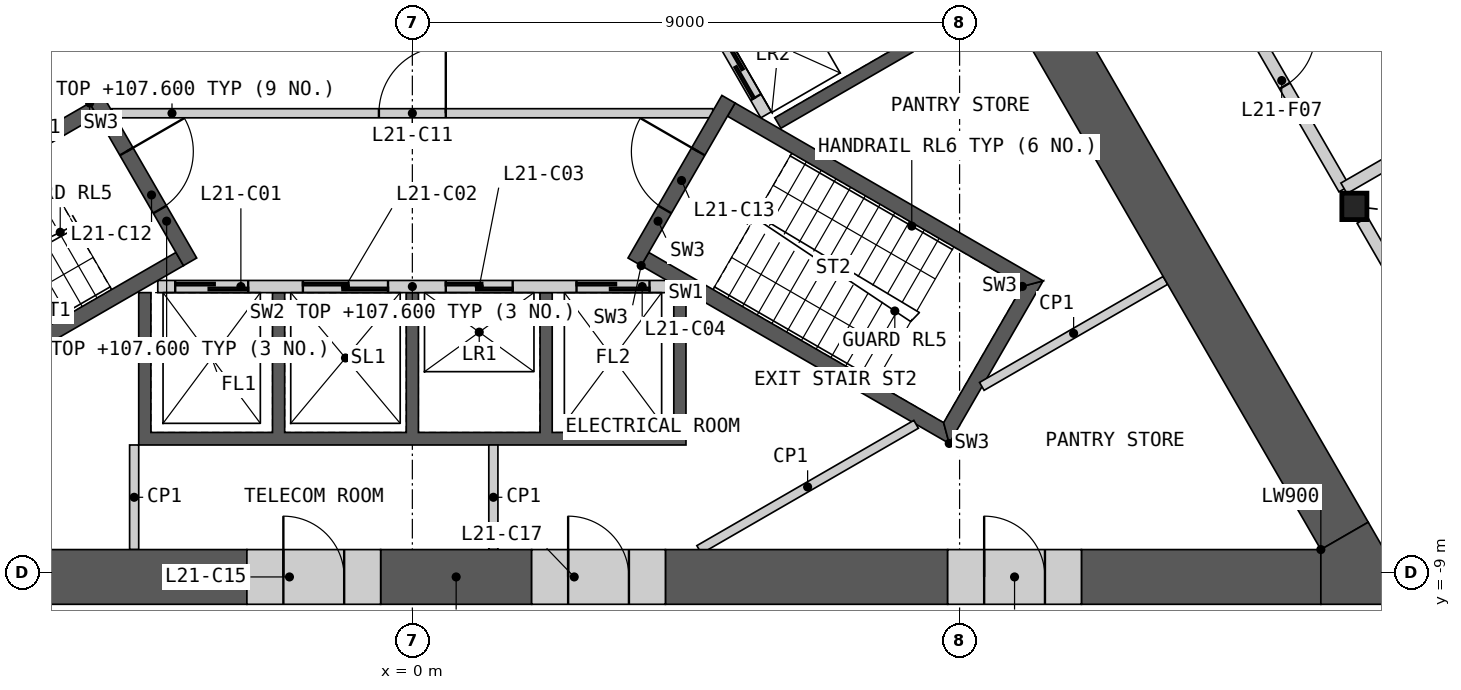
"""IFC4 building model, lengths in metres.
Left out: names, types, materials, properties, quantities, classifications, styles, units other than length and angle.
Written with IfcOpenShell. Run it as: python <this file> out.ifc"""

import sys

from ifc_helpers import new_model, si_unit, direction, frame, frame_2d, origin, origin_2d, place, context, subcontext, project, spatial, polyline, rectangle, i_section, outline, extrude, element, fill, save


model = new_model("IFC4")
c1 = context("Model", 3, precision=1e-05, world=origin(), true_north=direction((0.0, 1.0)))
c2 = subcontext(c1, "Body", "Model", "MODEL_VIEW")
j1 = project(units=[si_unit("LENGTHUNIT", "METRE"), si_unit("PLANEANGLEUNIT", "RADIAN")], contexts=[c1])
p1 = place(None, origin())
s1 = spatial("IfcSite", under=j1, at=p1, CompositionType="ELEMENT")
p2 = place(p1, origin())
s2 = spatial("IfcBuilding", under=s1, at=p2, CompositionType="ELEMENT")
p3 = place(p2, frame((0.0, 0.0, 103.8)))
s3 = spatial("IfcBuildingStorey", under=s2, at=p3, CompositionType="ELEMENT", Elevation=103.8)
p4 = place(p3, frame((15.493, -2.982, 0.0), z_axis=(0.0, 0.0, 1.0), x_axis=(1.0, 0.0, 0.0)))
e1 = element("IfcColumn", 1, at=p4, inside=s3, PredefinedType="COLUMN", context=c2, shape_type="SweptSolid", body=[
    extrude(i_section(OverallWidth=0.412, OverallDepth=0.435, WebThickness=0.036, FlangeThickness=0.057, at=origin_2d()), origin(), (0.0, 0.0, 1.0), 4.2),
])
p5 = place(p3, origin())
e2 = element("IfcWall", 2, at=p5, inside=s3, PredefinedType="SHEAR", context=c2, shape_type="SweptSolid", body=[
    extrude(outline(polyline([(4.5, -4.4), (4.5, -6.906), (-4.5, -6.906), (-4.5, -4.4), (-4.3, -4.4), (-4.3, -6.7), (-2.3, -6.7), (-2.3, -4.4), (-2.1, -4.4), (-2.1, -6.7), (-0.1, -6.7), (-0.1, -4.4), (0.1, -4.4), (0.1, -6.7), (2.1, -6.7), (2.1, -4.4), (2.3, -4.4), (2.3, -6.7), (4.3, -6.7), (4.3, -4.4), (4.5, -4.4)])), origin(), (0.0, 0.0, 1.0), 3.8),
])
p6 = place(p3, frame((-4.187, -4.3, 0.0), z_axis=(0.0, 0.0, 1.0), x_axis=(1.0, 0.0, 0.0)))
e3 = element("IfcWall", 3, at=p6, inside=s3, PredefinedType="SOLIDWALL", context=c2, shape_type="SweptSolid", body=[
    extrude(rectangle(XDim=8.373, YDim=0.2, at=frame_2d((4.187, 0.0))), origin(), (0.0, 0.0, 1.0), 3.8),
])
p7 = place(p6, frame((0.287, 0.0, 0.0)))
e4 = element("IfcOpeningElement", 4, at=p7, cuts=e3, PredefinedType="OPENING", context=c2, shape_type="SweptSolid", body=[
    extrude(rectangle(XDim=1.2, YDim=2.1, at=frame_2d((0.6, 1.05))), frame((0.0, 0.11, 0.0), z_axis=(0.0, -1.0, 0.0), x_axis=(1.0, 0.0, 0.0)), (0.0, 0.0, 1.0), 0.22),
])
p8 = place(p6, frame((2.387, 0.0, 0.0)))
e5 = element("IfcOpeningElement", 5, at=p8, cuts=e3, PredefinedType="OPENING", context=c2, shape_type="SweptSolid", body=[
    extrude(rectangle(XDim=1.4, YDim=2.1, at=frame_2d((0.7, 1.05))), frame((0.0, 0.11, 0.0), z_axis=(0.0, -1.0, 0.0), x_axis=(1.0, 0.0, 0.0)), (0.0, 0.0, 1.0), 0.22),
])
p9 = place(p6, frame((4.737, 0.0, 0.0)))
e6 = element("IfcOpeningElement", 6, at=p9, cuts=e3, PredefinedType="OPENING", context=c2, shape_type="SweptSolid", body=[
    extrude(rectangle(XDim=1.1, YDim=2.1, at=frame_2d((0.55, 1.05))), frame((0.0, 0.11, 0.0), z_axis=(0.0, -1.0, 0.0), x_axis=(1.0, 0.0, 0.0)), (0.0, 0.0, 1.0), 0.22),
])
p10 = place(p6, frame((6.887, 0.0, 0.0)))
e7 = element("IfcOpeningElement", 7, at=p10, cuts=e3, PredefinedType="OPENING", context=c2, shape_type="SweptSolid", body=[
    extrude(rectangle(XDim=1.2, YDim=2.1, at=frame_2d((0.6, 1.05))), frame((0.0, 0.11, 0.0), z_axis=(0.0, -1.0, 0.0), x_axis=(1.0, 0.0, 0.0)), (0.0, 0.0, 1.0), 0.22),
])
p11 = place(p3, origin())
e8 = element("IfcWall", 8, at=p11, inside=s3, PredefinedType="SHEAR", context=c2, shape_type="SweptSolid", body=[
    extrude(outline(polyline([(2.66, 4.192), (4.831, 5.445), (8.231, -0.444), (6.061, -1.697), (5.96, -1.524), (7.952, -0.374), (6.952, 1.358), (4.96, 0.208), (4.861, 0.381), (6.852, 1.531), (5.852, 3.263), (3.861, 2.113), (3.76, 2.287), (5.752, 3.437), (4.752, 5.169), (2.76, 4.019), (2.66, 4.192)])), origin(), (0.0, 0.0, 1.0), 3.8),
])
p12 = place(p3, frame((5.817, -1.476, 0.0), z_axis=(0.0, 0.0, 1.0), x_axis=(-0.500002616675, 0.866023893041, 0.0)))
e9 = element("IfcWall", 9, at=p12, inside=s3, PredefinedType="SOLIDWALL", context=c2, shape_type="SweptSolid", body=[
    extrude(rectangle(XDim=8.373, YDim=0.2, at=frame_2d((4.187, 0.0))), origin(), (0.0, 0.0, 1.0), 3.8),
])
p13 = place(p12, frame((0.337, 0.0, 0.0)))
e10 = element("IfcOpeningElement", 10, at=p13, cuts=e9, PredefinedType="OPENING", context=c2, shape_type="SweptSolid", body=[
    extrude(rectangle(XDim=1.1, YDim=2.1, at=frame_2d((0.55, 1.05))), frame((0.0, 0.11, 0.0), z_axis=(0.0, -1.0, 0.0), x_axis=(1.0, 0.0, 0.0)), (0.0, 0.0, 1.0), 0.22),
])
p14 = place(p12, frame((2.537, 0.0, 0.0)))
e11 = element("IfcOpeningElement", 11, at=p14, cuts=e9, PredefinedType="OPENING", context=c2, shape_type="SweptSolid", body=[
    extrude(rectangle(XDim=1.1, YDim=2.1, at=frame_2d((0.55, 1.05))), frame((0.0, 0.11, 0.0), z_axis=(0.0, -1.0, 0.0), x_axis=(1.0, 0.0, 0.0)), (0.0, 0.0, 1.0), 0.22),
])
p15 = place(p12, frame((4.737, 0.0, 0.0)))
e12 = element("IfcOpeningElement", 12, at=p15, cuts=e9, PredefinedType="OPENING", context=c2, shape_type="SweptSolid", body=[
    extrude(rectangle(XDim=1.1, YDim=2.1, at=frame_2d((0.55, 1.05))), frame((0.0, 0.11, 0.0), z_axis=(0.0, -1.0, 0.0), x_axis=(1.0, 0.0, 0.0)), (0.0, 0.0, 1.0), 0.22),
])
p16 = place(p12, frame((7.037, 0.0, 0.0)))
e13 = element("IfcOpeningElement", 13, at=p16, cuts=e9, PredefinedType="OPENING", context=c2, shape_type="SweptSolid", body=[
    extrude(rectangle(XDim=0.9, YDim=2.1, at=frame_2d((0.45, 1.05))), frame((0.0, 0.11, 0.0), z_axis=(0.0, -1.0, 0.0), x_axis=(1.0, 0.0, 0.0)), (0.0, 0.0, 1.0), 0.22),
])
p17 = place(p3, frame((-4.941, -1.45, 0.0), z_axis=(0.0, 0.0, 1.0), x_axis=(1.0, 0.0, 0.0)))
e14 = element("IfcWall", 14, at=p17, inside=s3, PredefinedType="PARTITIONING", context=c2, shape_type="SweptSolid", body=[
    extrude(rectangle(XDim=9.882, YDim=0.15, at=frame_2d((4.941, 0.0))), origin(), (0.0, 0.0, 1.0), 3.8),
])
p18 = place(p17, frame((4.391, 0.0, 0.0)))
e15 = element("IfcOpeningElement", 15, at=p18, cuts=e14, PredefinedType="OPENING", context=c2, shape_type="SweptSolid", body=[
    extrude(rectangle(XDim=1.1, YDim=2.1, at=frame_2d((0.55, 1.05))), frame((0.0, 0.085, 0.0), z_axis=(0.0, -1.0, 0.0), x_axis=(1.0, 0.0, 0.0)), (0.0, 0.0, 1.0), 0.17),
])
p19 = place(p3, origin())
e16 = element("IfcWall", 16, at=p19, inside=s3, PredefinedType="SHEAR", context=c2, shape_type="SweptSolid", body=[
    extrude(outline(polyline([(-5.307, -1.281), (-10.374, -4.206), (-10.032, -4.298), (-5.182, -1.498), (-5.307, -1.281)])), origin(), (0.0, 0.0, 1.0), 3.8),
])
p20 = place(p3, origin())
e17 = element("IfcWall", 17, at=p20, inside=s3, PredefinedType="SHEAR", context=c2, shape_type="SweptSolid", body=[
    extrude(outline(polyline([(-8.738, -6.539), (-8.83, -6.881), (-3.763, -3.956), (-3.888, -3.739), (-8.738, -6.539)])), origin(), (0.0, 0.0, 1.0), 3.8),
])
p21 = place(p3, frame((-5.199, -1.219, 0.0), z_axis=(0.0, 0.0, 1.0), x_axis=(0.499982516597, -0.866035497597, 0.0)))
e18 = element("IfcWall", 18, at=p21, inside=s3, PredefinedType="SHEAR", context=c2, shape_type="SweptSolid", body=[
    extrude(rectangle(XDim=3.088, YDim=0.25, at=frame_2d((1.544, 0.0))), origin(), (0.0, 0.0, 1.0), 3.8),
])
p22 = place(p21, frame((0.994, 0.0, 0.0)))
e19 = element("IfcOpeningElement", 19, at=p22, cuts=e18, PredefinedType="OPENING", context=c2, shape_type="SweptSolid", body=[
    extrude(rectangle(XDim=1.1, YDim=2.1, at=frame_2d((0.55, 1.05))), frame((0.0, 0.135, 0.0), z_axis=(0.0, -1.0, 0.0), x_axis=(1.0, 0.0, 0.0)), (0.0, 0.0, 1.0), 0.27),
])
p23 = place(p3, origin())
e20 = element("IfcWall", 20, at=p23, inside=s3, PredefinedType="SHEAR", context=c2, shape_type="SweptSolid", body=[
    extrude(outline(polyline([(3.763, -3.956), (8.83, -6.881), (8.738, -6.539), (3.888, -3.739), (3.763, -3.956)])), origin(), (0.0, 0.0, 1.0), 3.8),
])
p24 = place(p3, origin())
e21 = element("IfcWall", 21, at=p24, inside=s3, PredefinedType="SHEAR", context=c2, shape_type="SweptSolid", body=[
    extrude(outline(polyline([(8.83, -6.881), (10.374, -4.206), (10.032, -4.298), (8.738, -6.539), (8.83, -6.881)])), origin(), (0.0, 0.0, 1.0), 3.8),
])
p25 = place(p3, origin())
e22 = element("IfcWall", 22, at=p25, inside=s3, PredefinedType="SHEAR", context=c2, shape_type="SweptSolid", body=[
    extrude(outline(polyline([(10.032, -4.298), (10.374, -4.206), (5.307, -1.281), (5.182, -1.498), (10.032, -4.298)])), origin(), (0.0, 0.0, 1.0), 3.8),
])
p26 = place(p3, frame((3.655, -3.893, 0.0), z_axis=(0.0, 0.0, 1.0), x_axis=(0.499982516597, 0.866035497597, 0.0)))
e23 = element("IfcWall", 23, at=p26, inside=s3, PredefinedType="SHEAR", context=c2, shape_type="SweptSolid", body=[
    extrude(rectangle(XDim=3.088, YDim=0.25, at=frame_2d((1.544, 0.0))), origin(), (0.0, 0.0, 1.0), 3.8),
])
p27 = place(p26, frame((0.994, 0.0, 0.0)))
e24 = element("IfcOpeningElement", 24, at=p27, cuts=e23, PredefinedType="OPENING", context=c2, shape_type="SweptSolid", body=[
    extrude(rectangle(XDim=1.1, YDim=2.1, at=frame_2d((0.55, 1.05))), frame((0.0, 0.135, 0.0), z_axis=(0.0, -1.0, 0.0), x_axis=(1.0, 0.0, 0.0)), (0.0, 0.0, 1.0), 0.27),
])
for number, where, z_axis, x_axis in (
    (25, (-4.575, -6.906, 0.0), (0.0, 0.0, 1.0), (0.0, -1.0, 0.0)),
    (26, (1.333, -8.626, 0.0), (0.0, 0.0, 1.0), (0.0, 1.0, 0.0)),
):
    element("IfcWall", number, at=place(p3, frame(where, z_axis=z_axis, x_axis=x_axis)), inside=s3, PredefinedType="PARTITIONING", context=c2, shape_type="SweptSolid", body=[
        extrude(rectangle(XDim=1.72, YDim=0.15, at=frame_2d((0.86, 0.0))), origin(), (0.0, 0.0, 1.0), 3.8),
    ])
p28 = place(p3, frame((8.285, -6.566, 0.0), z_axis=(0.0, 0.0, 1.0), x_axis=(-0.866039554287, -0.49997548981, 0.0)))
e27 = element("IfcWall", 27, at=p28, inside=s3, PredefinedType="PARTITIONING", context=c2, shape_type="SweptSolid", body=[
    extrude(rectangle(XDim=4.12, YDim=0.15, at=frame_2d((2.06, 0.0))), origin(), (0.0, 0.0, 1.0), 3.8),
])
p29 = place(p3, frame((12.385, -4.199, 0.0), z_axis=(0.0, 0.0, 1.0), x_axis=(-0.86604566135, -0.499964911226, 0.0)))
e28 = element("IfcWall", 28, at=p29, inside=s3, PredefinedType="PARTITIONING", context=c2, shape_type="SweptSolid", body=[
    extrude(rectangle(XDim=3.487, YDim=0.15, at=frame_2d((1.743, 0.0))), origin(), (0.0, 0.0, 1.0), 3.8),
])
p30 = place(p3, frame((4.162, -9.076, 0.0), z_axis=(0.0, 0.0, 1.0), x_axis=(1.0, 0.0, 0.0)))
e29 = element("IfcWall", 29, at=p30, inside=s3, PredefinedType="SHEAR", context=c2, shape_type="SweptSolid", body=[
    extrude(rectangle(XDim=4.642, YDim=0.9, at=frame_2d((2.321, 0.0))), origin(), (0.0, 0.0, 1.0), 3.8),
])
p31 = place(p3, frame((-7.115, -9.076, 0.0), z_axis=(0.0, 0.0, 1.0), x_axis=(1.0, 0.0, 0.0)))
e30 = element("IfcWall", 30, at=p31, inside=s3, PredefinedType="SHEAR", context=c2, shape_type="SweptSolid", body=[
    extrude(rectangle(XDim=4.393, YDim=0.9, at=frame_2d((2.197, 0.0))), origin(), (0.0, 0.0, 1.0), 3.8),
])
p32 = place(p3, frame((11.004, -9.076, 0.0), z_axis=(0.0, 0.0, 1.0), x_axis=(1.0, 0.0, 0.0)))
e31 = element("IfcWall", 31, at=p32, inside=s3, PredefinedType="SHEAR", context=c2, shape_type="SweptSolid", body=[
    extrude(rectangle(XDim=3.937, YDim=0.9, at=frame_2d((1.969, 0.0))), origin(), (0.0, 0.0, 1.0), 3.8),
])
p33 = place(p3, frame((-0.521, -9.076, 0.0), z_axis=(0.0, 0.0, 1.0), x_axis=(1.0, 0.0, 0.0)))
e32 = element("IfcWall", 32, at=p33, inside=s3, PredefinedType="SHEAR", context=c2, shape_type="SweptSolid", body=[
    extrude(rectangle(XDim=2.483, YDim=0.9, at=frame_2d((1.242, 0.0))), origin(), (0.0, 0.0, 1.0), 3.8),
])
p34 = place(p3, frame((15.331, -8.401, 0.0), z_axis=(0.0, 0.0, 1.0), x_axis=(-0.499996094196, 0.86602765879, 0.0)))
e33 = element("IfcWall", 33, at=p34, inside=s3, PredefinedType="SHEAR", context=c2, shape_type="SweptSolid", body=[
    extrude(rectangle(XDim=10.014, YDim=0.9, at=frame_2d((5.007, 0.0))), origin(), (0.0, 0.0, 1.0), 3.8),
])
p35 = place(p3, origin())
e34 = element("IfcWall", 34, at=p35, inside=s3, PredefinedType="SHEAR", context=c2, shape_type="SweptSolid", body=[
    extrude(outline(polyline([(14.941, -8.626), (15.721, -8.176), (16.5, -9.526), (14.941, -9.526), (14.941, -8.626)])), origin(), (0.0, 0.0, 1.0), 3.8),
])
p36 = place(p3, frame((-2.721, -9.076, 0.0), z_axis=(0.0, 0.0, 1.0), x_axis=(1.0, 0.0, 0.0)))
e35 = element("IfcWall", 35, at=p36, inside=s3, PredefinedType="SHEAR", context=c2, shape_type="SweptSolid", body=[
    extrude(rectangle(XDim=2.2, YDim=0.9, at=frame_2d((1.1, 0.0))), origin(), (0.0, 0.0, 1.0), 3.8),
])
p37 = place(p36, frame((0.6, 0.0, 0.0)))
e36 = element("IfcOpeningElement", 36, at=p37, cuts=e35, PredefinedType="OPENING", context=c2, shape_type="SweptSolid", body=[
    extrude(rectangle(XDim=1.0, YDim=2.1, at=frame_2d((0.5, 1.05))), frame((0.0, 0.46, 0.0), z_axis=(0.0, -1.0, 0.0), x_axis=(1.0, 0.0, 0.0)), (0.0, 0.0, 1.0), 0.92),
])
p38 = place(p3, frame((8.804, -9.076, 0.0), z_axis=(0.0, 0.0, 1.0), x_axis=(1.0, 0.0, 0.0)))
e37 = element("IfcWall", 37, at=p38, inside=s3, PredefinedType="SHEAR", context=c2, shape_type="SweptSolid", body=[
    extrude(rectangle(XDim=2.2, YDim=0.9, at=frame_2d((1.1, 0.0))), origin(), (0.0, 0.0, 1.0), 3.8),
])
p39 = place(p38, frame((0.6, 0.0, 0.0)))
e38 = element("IfcOpeningElement", 38, at=p39, cuts=e37, PredefinedType="OPENING", context=c2, shape_type="SweptSolid", body=[
    extrude(rectangle(XDim=1.0, YDim=2.1, at=frame_2d((0.5, 1.05))), frame((0.0, 0.46, 0.0), z_axis=(0.0, -1.0, 0.0), x_axis=(1.0, 0.0, 0.0)), (0.0, 0.0, 1.0), 0.92),
])
p40 = place(p3, frame((1.962, -9.076, 0.0), z_axis=(0.0, 0.0, 1.0), x_axis=(1.0, 0.0, 0.0)))
e39 = element("IfcWall", 39, at=p40, inside=s3, PredefinedType="SHEAR", context=c2, shape_type="SweptSolid", body=[
    extrude(rectangle(XDim=2.2, YDim=0.9, at=frame_2d((1.1, 0.0))), origin(), (0.0, 0.0, 1.0), 3.8),
])
p41 = place(p40, frame((0.6, 0.0, 0.0)))
e40 = element("IfcOpeningElement", 40, at=p41, cuts=e39, PredefinedType="OPENING", context=c2, shape_type="SweptSolid", body=[
    extrude(rectangle(XDim=1.0, YDim=2.1, at=frame_2d((0.5, 1.05))), frame((0.0, 0.46, 0.0), z_axis=(0.0, -1.0, 0.0), x_axis=(1.0, 0.0, 0.0)), (0.0, 0.0, 1.0), 0.92),
])
p42 = place(p3, frame((10.46, 5.736, 0.0), z_axis=(0.0, 0.0, 1.0), x_axis=(0.500010522431, -0.866019328571, 0.0)))
e41 = element("IfcWall", 41, at=p42, inside=s3, PredefinedType="PARTITIONING", context=c2, shape_type="SweptSolid", body=[
    extrude(rectangle(XDim=9.733, YDim=0.2, at=frame_2d((4.866, 0.0))), origin(), (0.0, 0.0, 1.0), 3.8),
])
p43 = place(p42, frame((6.776, 0.0, 0.0)))
e42 = element("IfcOpeningElement", 42, at=p43, cuts=e41, PredefinedType="OPENING", context=c2, shape_type="SweptSolid", body=[
    extrude(rectangle(XDim=1.0, YDim=2.1, at=frame_2d((0.5, 1.05))), frame((0.0, 0.11, 0.0), z_axis=(0.0, -1.0, 0.0), x_axis=(1.0, 0.0, 0.0)), (0.0, 0.0, 1.0), 0.22),
])
p44 = place(p42, frame((1.856, 0.0, 0.0)))
e43 = element("IfcOpeningElement", 43, at=p44, cuts=e41, PredefinedType="OPENING", context=c2, shape_type="SweptSolid", body=[
    extrude(rectangle(XDim=1.0, YDim=2.1, at=frame_2d((0.5, 1.05))), frame((0.0, 0.11, 0.0), z_axis=(0.0, -1.0, 0.0), x_axis=(1.0, 0.0, 0.0)), (0.0, 0.0, 1.0), 0.22),
])
p45 = place(p3, frame((15.624, -3.209, 0.0), z_axis=(0.0, 0.0, 1.0), x_axis=(0.499997920671, -0.866026604282, 0.0)))
e44 = element("IfcWall", 44, at=p45, inside=s3, PredefinedType="PARTITIONING", context=c2, shape_type="SweptSolid", body=[
    extrude(rectangle(XDim=6.24, YDim=0.2, at=frame_2d((3.12, 0.0))), origin(), (0.0, 0.0, 1.0), 3.8),
])
p46 = place(p45, frame((2.57, 0.0, 0.0)))
e45 = element("IfcOpeningElement", 45, at=p46, cuts=e44, PredefinedType="OPENING", context=c2, shape_type="SweptSolid", body=[
    extrude(rectangle(XDim=1.0, YDim=2.1, at=frame_2d((0.5, 1.05))), frame((0.0, 0.11, 0.0), z_axis=(0.0, -1.0, 0.0), x_axis=(1.0, 0.0, 0.0)), (0.0, 0.0, 1.0), 0.22),
])
p47 = place(p3, frame((15.321, -2.684, 0.0), z_axis=(0.0, 0.0, 1.0), x_axis=(0.866029068465, 0.499993652534, 0.0)))
e46 = element("IfcWall", 46, at=p47, inside=s3, PredefinedType="PARTITIONING", context=c2, shape_type="SweptSolid", body=[
    extrude(rectangle(XDim=13.066, YDim=0.2, at=frame_2d((6.533, 0.0))), origin(), (0.0, 0.0, 1.0), 2.885),
])
p48 = place(p7, origin())
e47 = element("IfcDoor", 47, at=p48, inside=s3, OperationType="SLIDING_TO_LEFT", PredefinedType="DOOR", context=c2, shape_type="SweptSolid", body=[
    extrude(rectangle(XDim=1.2, YDim=2.1, at=frame_2d((0.6, 1.05))), frame((0.0, 0.025, 0.0), z_axis=(0.0, -1.0, 0.0), x_axis=(1.0, 0.0, 0.0)), (0.0, 0.0, 1.0), 0.05),
])
fill(e4, e47)
p49 = place(p8, origin())
e48 = element("IfcDoor", 48, at=p49, inside=s3, OperationType="SLIDING_TO_LEFT", PredefinedType="DOOR", context=c2, shape_type="SweptSolid", body=[
    extrude(rectangle(XDim=1.4, YDim=2.1, at=frame_2d((0.7, 1.05))), frame((0.0, 0.025, 0.0), z_axis=(0.0, -1.0, 0.0), x_axis=(1.0, 0.0, 0.0)), (0.0, 0.0, 1.0), 0.05),
])
fill(e5, e48)
p50 = place(p9, origin())
e49 = element("IfcDoor", 49, at=p50, inside=s3, OperationType="SLIDING_TO_LEFT", PredefinedType="DOOR", context=c2, shape_type="SweptSolid", body=[
    extrude(rectangle(XDim=1.1, YDim=2.1, at=frame_2d((0.55, 1.05))), frame((0.0, 0.025, 0.0), z_axis=(0.0, -1.0, 0.0), x_axis=(1.0, 0.0, 0.0)), (0.0, 0.0, 1.0), 0.05),
])
fill(e6, e49)
p51 = place(p10, origin())
e50 = element("IfcDoor", 50, at=p51, inside=s3, OperationType="SLIDING_TO_LEFT", PredefinedType="DOOR", context=c2, shape_type="SweptSolid", body=[
    extrude(rectangle(XDim=1.2, YDim=2.1, at=frame_2d((0.6, 1.05))), frame((0.0, 0.025, 0.0), z_axis=(0.0, -1.0, 0.0), x_axis=(1.0, 0.0, 0.0)), (0.0, 0.0, 1.0), 0.05),
])
fill(e7, e50)
p52 = place(p13, origin())
e51 = element("IfcDoor", 51, at=p52, inside=s3, OperationType="SLIDING_TO_LEFT", PredefinedType="DOOR", context=c2, shape_type="SweptSolid", body=[
    extrude(rectangle(XDim=1.1, YDim=2.1, at=frame_2d((0.55, 1.05))), frame((0.0, 0.025, 0.0), z_axis=(0.0, -1.0, 0.0), x_axis=(1.0, 0.0, 0.0)), (0.0, 0.0, 1.0), 0.05),
])
fill(e10, e51)
p53 = place(p18, origin())
e52 = element("IfcDoor", 52, at=p53, inside=s3, OperationType="SINGLE_SWING_RIGHT", PredefinedType="DOOR", context=c2, shape_type="SweptSolid", body=[
    extrude(rectangle(XDim=1.1, YDim=2.1, at=frame_2d((0.55, 1.05))), frame((0.0, 0.025, 0.0), z_axis=(0.0, -1.0, 0.0), x_axis=(1.0, 0.0, 0.0)), (0.0, 0.0, 1.0), 0.05),
])
fill(e15, e52)
p54 = place(p22, origin())
e53 = element("IfcDoor", 53, at=p54, inside=s3, OperationType="SINGLE_SWING_LEFT", PredefinedType="DOOR", context=c2, shape_type="SweptSolid", body=[
    extrude(rectangle(XDim=1.1, YDim=2.1, at=frame_2d((0.55, 1.05))), frame((0.0, 0.025, 0.0), z_axis=(0.0, -1.0, 0.0), x_axis=(1.0, 0.0, 0.0)), (0.0, 0.0, 1.0), 0.05),
])
fill(e19, e53)
p55 = place(p27, origin())
e54 = element("IfcDoor", 54, at=p55, inside=s3, OperationType="SINGLE_SWING_RIGHT", PredefinedType="DOOR", context=c2, shape_type="SweptSolid", body=[
    extrude(rectangle(XDim=1.1, YDim=2.1, at=frame_2d((0.55, 1.05))), frame((0.0, 0.025, 0.0), z_axis=(0.0, -1.0, 0.0), x_axis=(1.0, 0.0, 0.0)), (0.0, 0.0, 1.0), 0.05),
])
fill(e24, e54)
p56 = place(p37, origin())
e55 = element("IfcDoor", 55, at=p56, inside=s3, OperationType="SINGLE_SWING_LEFT", PredefinedType="DOOR", context=c2, shape_type="SweptSolid", body=[
    extrude(rectangle(XDim=1.0, YDim=2.1, at=frame_2d((0.5, 1.05))), frame((0.0, 0.205, 0.0), z_axis=(0.0, -1.0, 0.0), x_axis=(1.0, 0.0, 0.0)), (0.0, 0.0, 1.0), 0.05),
])
fill(e36, e55)
p57 = place(p39, origin())
e56 = element("IfcDoor", 56, at=p57, inside=s3, OperationType="SINGLE_SWING_LEFT", PredefinedType="DOOR", context=c2, shape_type="SweptSolid", body=[
    extrude(rectangle(XDim=1.0, YDim=2.1, at=frame_2d((0.5, 1.05))), frame((0.0, 0.205, 0.0), z_axis=(0.0, -1.0, 0.0), x_axis=(1.0, 0.0, 0.0)), (0.0, 0.0, 1.0), 0.05),
])
fill(e38, e56)
p58 = place(p41, origin())
e57 = element("IfcDoor", 57, at=p58, inside=s3, OperationType="SINGLE_SWING_LEFT", PredefinedType="DOOR", context=c2, shape_type="SweptSolid", body=[
    extrude(rectangle(XDim=1.0, YDim=2.1, at=frame_2d((0.5, 1.05))), frame((0.0, 0.205, 0.0), z_axis=(0.0, -1.0, 0.0), x_axis=(1.0, 0.0, 0.0)), (0.0, 0.0, 1.0), 0.05),
])
fill(e40, e57)
p59 = place(p43, origin())
e58 = element("IfcDoor", 58, at=p59, inside=s3, OperationType="SINGLE_SWING_LEFT", PredefinedType="DOOR", context=c2, shape_type="SweptSolid", body=[
    extrude(rectangle(XDim=1.0, YDim=2.1, at=frame_2d((0.5, 1.05))), frame((0.0, 0.025, 0.0), z_axis=(0.0, -1.0, 0.0), x_axis=(1.0, 0.0, 0.0)), (0.0, 0.0, 1.0), 0.05),
])
fill(e42, e58)
save(model, sys.argv[1])
